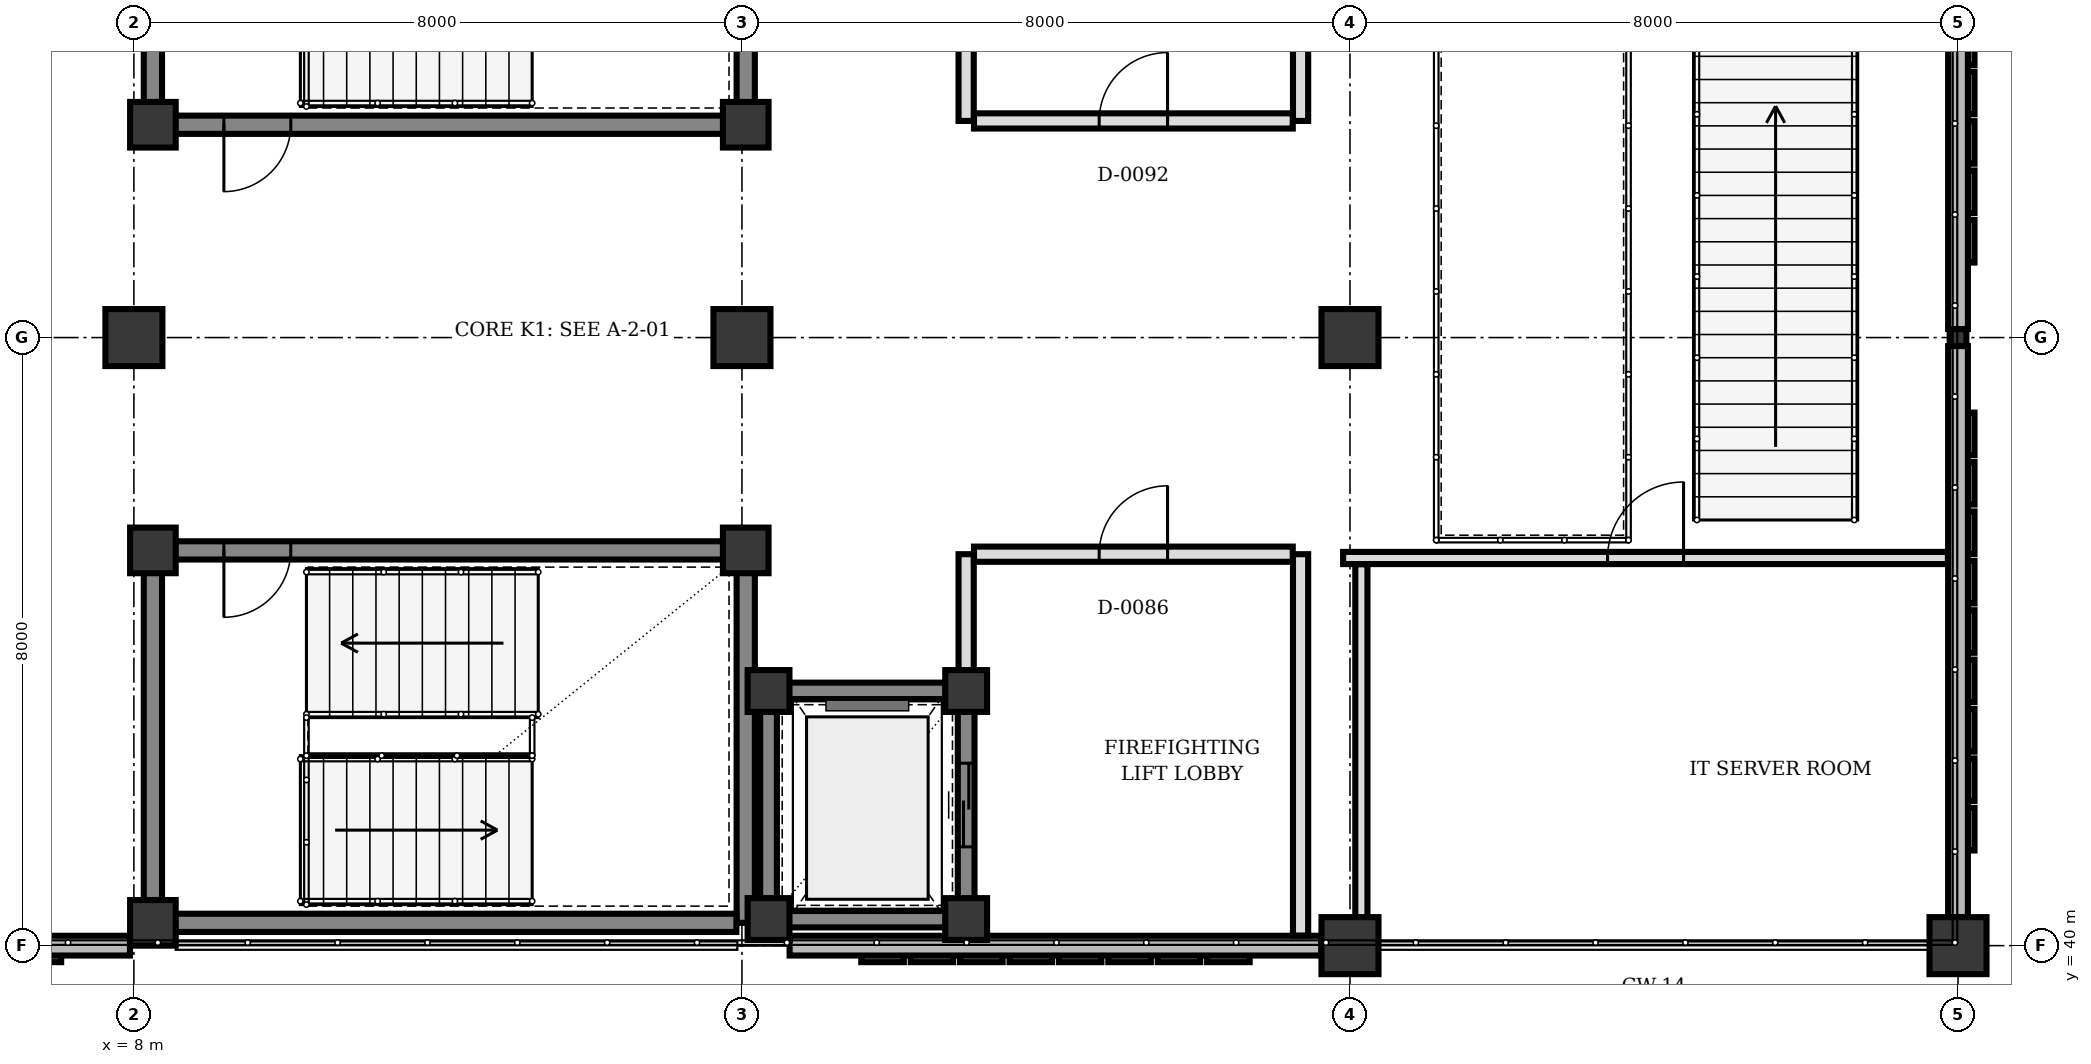
"""IFC4 building model, lengths in metres.
Left out: names, types, materials, properties, quantities, classifications, styles, units other than length and angle.
Written with IfcOpenShell. Run it as: python <this file> out.ifc"""

import sys

from ifc_helpers import new_model, si_unit, direction, frame, frame_2d, origin, origin_2d, place, context, subcontext, project, spatial, rectangle, hollow_rectangle, extrude, element, fill, save


model = new_model("IFC4")
c1 = context("Model", 3, precision=1e-05, world=origin(), true_north=direction((0.0, 1.0)))
c2 = subcontext(c1, "Body", "Model", "MODEL_VIEW")
j1 = project(units=[si_unit("LENGTHUNIT", "METRE"), si_unit("PLANEANGLEUNIT", "RADIAN")], contexts=[c1])
p1 = place(None, origin())
s1 = spatial("IfcSite", under=j1, at=p1, CompositionType="ELEMENT")
p2 = place(p1, origin())
s2 = spatial("IfcBuilding", under=s1, at=p2, CompositionType="ELEMENT")
p3 = place(p2, frame((0.0, 0.0, 4.5)))
s3 = spatial("IfcBuildingStorey", under=s2, at=p3, CompositionType="ELEMENT", Elevation=4.5)
for number, where, z_axis, x_axis in (
    (1, (8.25, 40.3, 0.0), (0.0, 0.0, 1.0), (1.0, 0.0, 0.0)),
    (2, (16.05, 45.2, 0.0), (0.0, 0.0, 1.0), (1.0, 0.0, 0.0)),
    (3, (8.25, 45.2, 0.0), (0.0, 0.0, 1.0), (1.0, 0.0, 0.0)),
    (4, (8.25, 50.8, 0.0), (0.0, 0.0, 1.0), (1.0, 0.0, 0.0)),
    (5, (16.05, 50.8, 0.0), (0.0, 0.0, 1.0), (1.0, 0.0, 0.0)),
):
    element("IfcColumn", number, at=place(p3, frame(where, z_axis=z_axis, x_axis=x_axis)), inside=s3, PredefinedType="COLUMN", context=c2, shape_type="SweptSolid", body=[
        extrude(rectangle(XDim=0.6, YDim=0.6, at=origin_2d()), origin(), (0.0, 0.0, 1.0), 4.0),
    ])
for number, where, z_axis, x_axis in (
    (6, (16.35, 40.35, 0.0), (0.0, 0.0, 1.0), (1.0, 0.0, 0.0)),
    (7, (18.95, 40.35, 0.0), (0.0, 0.0, 1.0), (1.0, 0.0, 0.0)),
    (8, (18.95, 43.35, 0.0), (0.0, 0.0, 1.0), (1.0, 0.0, 0.0)),
    (9, (16.35, 43.35, 0.0), (0.0, 0.0, 1.0), (1.0, 0.0, 0.0)),
):
    element("IfcColumn", number, at=place(p3, frame(where, z_axis=z_axis, x_axis=x_axis)), inside=s3, PredefinedType="COLUMN", context=c2, shape_type="SweptSolid", body=[
        extrude(rectangle(XDim=0.55, YDim=0.55, at=origin_2d()), origin(), (0.0, 0.0, 1.0), 4.0),
    ])
for number, where, z_axis, x_axis in (
    (10, (16.0, 48.0, 0.0), (0.0, 0.0, 1.0), (1.0, 0.0, 0.0)),
    (11, (24.0, 40.0, 0.0), (0.0, 0.0, 1.0), (1.0, 0.0, 0.0)),
    (12, (24.0, 48.0, 0.0), (0.0, 0.0, 1.0), (1.0, 0.0, 0.0)),
    (13, (32.0, 40.0, 0.0), (0.0, 0.0, 1.0), (1.0, 0.0, 0.0)),
):
    element("IfcColumn", number, at=place(p3, frame(where, z_axis=z_axis, x_axis=x_axis)), inside=s3, PredefinedType="COLUMN", context=c2, shape_type="SweptSolid", body=[
        extrude(rectangle(XDim=0.75, YDim=0.75, at=origin_2d()), origin(), (0.0, 0.0, 1.0), 4.0),
    ])
p4 = place(p3, frame((32.0, 48.0, 0.0), z_axis=(0.0, 0.0, 1.0), x_axis=(1.0, 0.0, 0.0)))
e14 = element("IfcColumn", 14, at=p4, inside=s3, PredefinedType="COLUMN", context=c2, shape_type="SweptSolid", body=[
    extrude(hollow_rectangle(XDim=0.22, YDim=0.22, WallThickness=0.01, at=origin_2d()), origin(), (0.0, 0.0, 1.0), 4.0),
])
p5 = place(p3, frame((8.0, 48.0, 0.0), z_axis=(0.0, 0.0, 1.0), x_axis=(1.0, 0.0, 0.0)))
e15 = element("IfcColumn", 15, at=p5, inside=s3, PredefinedType="COLUMN", context=c2, shape_type="SweptSolid", body=[
    extrude(rectangle(XDim=0.75, YDim=0.75, at=origin_2d()), origin(), (0.0, 0.0, 1.0), 4.0),
])
for number, where, z_axis, x_axis in (
    (16, (32.0, 55.623, 0.0), (0.0, 0.0, 1.0), (0.0, -1.0, 0.0)),
    (17, (32.0, 47.888, 0.0), (0.0, 0.0, 1.0), (0.0, -1.0, 0.0)),
):
    element("IfcWall", number, at=place(p3, frame(where, z_axis=z_axis, x_axis=x_axis)), inside=s3, PredefinedType="SOLIDWALL", context=c2, shape_type="SweptSolid", body=[
        extrude(rectangle(XDim=7.511, YDim=0.26, at=frame_2d((3.755, 0.0))), origin(), (0.0, 0.0, 1.0), 3.132),
    ])
p6 = place(p3, frame((23.623, 40.0, 0.0), z_axis=(0.0, 0.0, 1.0), x_axis=(-1.0, 0.0, 0.0)))
e18 = element("IfcWall", 18, at=p6, inside=s3, PredefinedType="SOLIDWALL", context=c2, shape_type="SweptSolid", body=[
    extrude(rectangle(XDim=6.996, YDim=0.26, at=frame_2d((3.498, 0.0))), origin(), (0.0, 0.0, 1.0), 3.55),
])
p7 = place(p3, frame((7.948, 40.0, 0.0), z_axis=(0.0, 0.0, 1.0), x_axis=(-1.0, 0.0, 0.0)))
e19 = element("IfcWall", 19, at=p7, inside=s3, PredefinedType="SOLIDWALL", context=c2, shape_type="SweptSolid", body=[
    extrude(rectangle(XDim=7.571, YDim=0.26, at=frame_2d((3.786, 0.0))), origin(), (0.0, 0.0, 1.0), 3.55),
])
p8 = place(p7, frame((1.696, 0.0, 0.9)))
e20 = element("IfcOpeningElement", 20, at=p8, cuts=e19, PredefinedType="OPENING", context=c2, shape_type="SweptSolid", body=[
    extrude(rectangle(XDim=1.15, YDim=1.25, at=frame_2d((0.575, 0.625))), frame((0.0, 0.14, 0.0), z_axis=(0.0, -1.0, 0.0), x_axis=(1.0, 0.0, 0.0)), (0.0, 0.0, 1.0), 0.28),
])
p9 = place(p3, frame((8.25, 40.592, 0.0), z_axis=(0.0, 0.0, 1.0), x_axis=(0.0, 1.0, 0.0)))
e21 = element("IfcWall", 21, at=p9, inside=s3, PredefinedType="SHEAR", context=c2, shape_type="SweptSolid", body=[
    extrude(rectangle(XDim=4.316, YDim=0.24, at=frame_2d((2.158, 0.0))), origin(), (0.0, 0.0, 1.0), 3.74),
])
p10 = place(p3, frame((16.05, 44.908, 0.0), z_axis=(0.0, 0.0, 1.0), x_axis=(0.0, -1.0, 0.0)))
e22 = element("IfcWall", 22, at=p10, inside=s3, PredefinedType="SHEAR", context=c2, shape_type="SweptSolid", body=[
    extrude(rectangle(XDim=4.608, YDim=0.24, at=frame_2d((2.304, 0.0))), origin(), (0.0, 0.0, 1.0), 3.74),
])
p11 = place(p3, frame((15.927, 40.3, 0.0), z_axis=(0.0, 0.0, 1.0), x_axis=(-1.0, 0.0, 0.0)))
e23 = element("IfcWall", 23, at=p11, inside=s3, PredefinedType="SHEAR", context=c2, shape_type="SweptSolid", body=[
    extrude(rectangle(XDim=7.385, YDim=0.24, at=frame_2d((3.692, 0.0))), origin(), (0.0, 0.0, 1.0), 3.74),
])
p12 = place(p3, frame((15.758, 45.2, 0.0), z_axis=(0.0, 0.0, 1.0), x_axis=(-1.0, 0.0, 0.0)))
e24 = element("IfcWall", 24, at=p12, inside=s3, PredefinedType="SHEAR", context=c2, shape_type="SweptSolid", body=[
    extrude(rectangle(XDim=7.216, YDim=0.24, at=frame_2d((3.608, 0.0))), origin(), (0.0, 0.0, 1.0), 3.74),
])
p13 = place(p12, frame((5.694, 0.0, 0.0)))
e25 = element("IfcOpeningElement", 25, at=p13, cuts=e24, PredefinedType="OPENING", context=c2, shape_type="SweptSolid", body=[
    extrude(rectangle(XDim=0.88, YDim=2.1, at=frame_2d((0.44, 1.05))), frame((0.0, 0.13, 0.0), z_axis=(0.0, -1.0, 0.0), x_axis=(1.0, 0.0, 0.0)), (0.0, 0.0, 1.0), 0.26),
])
p14 = place(p3, frame((8.25, 51.092, 0.0), z_axis=(0.0, 0.0, 1.0), x_axis=(0.0, 1.0, 0.0)))
e26 = element("IfcWall", 26, at=p14, inside=s3, PredefinedType="SHEAR", context=c2, shape_type="SweptSolid", body=[
    extrude(rectangle(XDim=4.316, YDim=0.24, at=frame_2d((2.158, 0.0))), origin(), (0.0, 0.0, 1.0), 3.74),
])
p15 = place(p3, frame((16.05, 55.7, 0.0), z_axis=(0.0, 0.0, 1.0), x_axis=(0.0, -1.0, 0.0)))
e27 = element("IfcWall", 27, at=p15, inside=s3, PredefinedType="SHEAR", context=c2, shape_type="SweptSolid", body=[
    extrude(rectangle(XDim=4.608, YDim=0.24, at=frame_2d((2.304, 0.0))), origin(), (0.0, 0.0, 1.0), 3.74),
])
p16 = place(p3, frame((15.758, 50.8, 0.0), z_axis=(0.0, 0.0, 1.0), x_axis=(-1.0, 0.0, 0.0)))
e28 = element("IfcWall", 28, at=p16, inside=s3, PredefinedType="SHEAR", context=c2, shape_type="SweptSolid", body=[
    extrude(rectangle(XDim=7.216, YDim=0.24, at=frame_2d((3.608, 0.0))), origin(), (0.0, 0.0, 1.0), 3.74),
])
p17 = place(p16, frame((5.694, 0.0, 0.0)))
e29 = element("IfcOpeningElement", 29, at=p17, cuts=e28, PredefinedType="OPENING", context=c2, shape_type="SweptSolid", body=[
    extrude(rectangle(XDim=0.88, YDim=2.1, at=frame_2d((0.44, 1.05))), frame((0.0, 0.13, 0.0), z_axis=(0.0, -1.0, 0.0), x_axis=(1.0, 0.0, 0.0)), (0.0, 0.0, 1.0), 0.26),
])
p18 = place(p3, frame((16.617, 40.35, 0.0), z_axis=(0.0, 0.0, 1.0), x_axis=(1.0, 0.0, 0.0)))
e30 = element("IfcWall", 30, at=p18, inside=s3, PredefinedType="SHEAR", context=c2, shape_type="SweptSolid", body=[
    extrude(rectangle(XDim=2.066, YDim=0.22, at=frame_2d((1.033, 0.0))), origin(), (0.0, 0.0, 1.0), 3.74),
])
p19 = place(p3, frame((18.95, 40.617, 0.0), z_axis=(0.0, 0.0, 1.0), x_axis=(0.0, 1.0, 0.0)))
e31 = element("IfcWall", 31, at=p19, inside=s3, PredefinedType="SHEAR", context=c2, shape_type="SweptSolid", body=[
    extrude(rectangle(XDim=2.466, YDim=0.22, at=frame_2d((1.233, 0.0))), origin(), (0.0, 0.0, 1.0), 3.74),
])
p20 = place(p19, frame((0.683, 0.0, 0.0)))
e32 = element("IfcOpeningElement", 32, at=p20, cuts=e31, PredefinedType="OPENING", context=c2, shape_type="SweptSolid", body=[
    extrude(rectangle(XDim=1.1, YDim=2.15, at=frame_2d((0.55, 1.075))), frame((0.0, 0.12, 0.0), z_axis=(0.0, -1.0, 0.0), x_axis=(1.0, 0.0, 0.0)), (0.0, 0.0, 1.0), 0.24),
])
p21 = place(p3, frame((18.683, 43.35, 0.0), z_axis=(0.0, 0.0, 1.0), x_axis=(-1.0, 0.0, 0.0)))
e33 = element("IfcWall", 33, at=p21, inside=s3, PredefinedType="SHEAR", context=c2, shape_type="SweptSolid", body=[
    extrude(rectangle(XDim=2.066, YDim=0.22, at=frame_2d((1.033, 0.0))), origin(), (0.0, 0.0, 1.0), 3.74),
])
p22 = place(p3, frame((16.35, 43.083, 0.0), z_axis=(0.0, 0.0, 1.0), x_axis=(0.0, -1.0, 0.0)))
e34 = element("IfcWall", 34, at=p22, inside=s3, PredefinedType="SHEAR", context=c2, shape_type="SweptSolid", body=[
    extrude(rectangle(XDim=2.466, YDim=0.22, at=frame_2d((1.233, 0.0))), origin(), (0.0, 0.0, 1.0), 3.74),
])
p23 = place(p3, frame((18.95, 43.617, 0.0), z_axis=(0.0, 0.0, 1.0), x_axis=(0.0, 1.0, 0.0)))
e35 = element("IfcWall", 35, at=p23, inside=s3, PredefinedType="PARTITIONING", context=c2, shape_type="SweptSolid", body=[
    extrude(rectangle(XDim=1.533, YDim=0.2, at=frame_2d((0.767, 0.0))), origin(), (0.0, 0.0, 1.0), 3.7),
])
p24 = place(p3, frame((23.35, 40.133, 0.0), z_axis=(0.0, 0.0, 1.0), x_axis=(0.0, 1.0, 0.0)))
e36 = element("IfcWall", 36, at=p24, inside=s3, PredefinedType="PARTITIONING", context=c2, shape_type="SweptSolid", body=[
    extrude(rectangle(XDim=5.017, YDim=0.2, at=frame_2d((2.508, 0.0))), origin(), (0.0, 0.0, 1.0), 3.7),
])
p25 = place(p3, frame((19.053, 45.15, 0.0), z_axis=(0.0, 0.0, 1.0), x_axis=(1.0, 0.0, 0.0)))
e37 = element("IfcWall", 37, at=p25, inside=s3, PredefinedType="PARTITIONING", context=c2, shape_type="SweptSolid", body=[
    extrude(rectangle(XDim=4.194, YDim=0.2, at=frame_2d((2.097, 0.0))), origin(), (0.0, 0.0, 1.0), 3.7),
])
p26 = place(p25, frame((1.647, 0.0, 0.0)))
e38 = element("IfcOpeningElement", 38, at=p26, cuts=e37, PredefinedType="OPENING", context=c2, shape_type="SweptSolid", body=[
    extrude(rectangle(XDim=0.9, YDim=2.2, at=frame_2d((0.45, 1.1))), frame((0.0, 0.11, 0.0), z_axis=(0.0, -1.0, 0.0), x_axis=(1.0, 0.0, 0.0)), (0.0, 0.0, 1.0), 0.22),
])
p27 = place(p3, frame((18.95, 50.85, 0.0), z_axis=(0.0, 0.0, 1.0), x_axis=(0.0, 1.0, 0.0)))
e39 = element("IfcWall", 39, at=p27, inside=s3, PredefinedType="PARTITIONING", context=c2, shape_type="SweptSolid", body=[
    extrude(rectangle(XDim=1.533, YDim=0.2, at=frame_2d((0.767, 0.0))), origin(), (0.0, 0.0, 1.0), 3.7),
])
p28 = place(p3, frame((23.35, 50.85, 0.0), z_axis=(0.0, 0.0, 1.0), x_axis=(0.0, 1.0, 0.0)))
e40 = element("IfcWall", 40, at=p28, inside=s3, PredefinedType="PARTITIONING", context=c2, shape_type="SweptSolid", body=[
    extrude(rectangle(XDim=4.8, YDim=0.2, at=frame_2d((2.4, 0.0))), origin(), (0.0, 0.0, 1.0), 3.7),
])
p29 = place(p3, frame((19.053, 50.85, 0.0), z_axis=(0.0, 0.0, 1.0), x_axis=(1.0, 0.0, 0.0)))
e41 = element("IfcWall", 41, at=p29, inside=s3, PredefinedType="PARTITIONING", context=c2, shape_type="SweptSolid", body=[
    extrude(rectangle(XDim=4.194, YDim=0.2, at=frame_2d((2.097, 0.0))), origin(), (0.0, 0.0, 1.0), 3.7),
])
p30 = place(p29, frame((1.647, 0.0, 0.0)))
e42 = element("IfcOpeningElement", 42, at=p30, cuts=e41, PredefinedType="OPENING", context=c2, shape_type="SweptSolid", body=[
    extrude(rectangle(XDim=0.9, YDim=2.2, at=frame_2d((0.45, 1.1))), frame((0.0, 0.11, 0.0), z_axis=(0.0, -1.0, 0.0), x_axis=(1.0, 0.0, 0.0)), (0.0, 0.0, 1.0), 0.22),
])
p31 = place(p3, frame((23.91, 45.1, 0.0), z_axis=(0.0, 0.0, 1.0), x_axis=(1.0, 0.0, 0.0)))
e43 = element("IfcWall", 43, at=p31, inside=s3, PredefinedType="PARTITIONING", context=c2, shape_type="SweptSolid", body=[
    extrude(rectangle(XDim=7.957, YDim=0.16, at=frame_2d((3.979, 0.0))), origin(), (0.0, 0.0, 1.0), 3.132),
])
p32 = place(p31, frame((3.479, 0.0, 0.0)))
e44 = element("IfcOpeningElement", 44, at=p32, cuts=e43, PredefinedType="OPENING", context=c2, shape_type="SweptSolid", body=[
    extrude(rectangle(XDim=1.0, YDim=2.1, at=frame_2d((0.5, 1.05))), frame((0.0, 0.09, 0.0), z_axis=(0.0, -1.0, 0.0), x_axis=(1.0, 0.0, 0.0)), (0.0, 0.0, 1.0), 0.18),
])
p33 = place(p3, frame((24.15, 40.367, 0.0), z_axis=(0.0, 0.0, 1.0), x_axis=(0.0, 1.0, 0.0)))
e45 = element("IfcWall", 45, at=p33, inside=s3, PredefinedType="PARTITIONING", context=c2, shape_type="SweptSolid", body=[
    extrude(rectangle(XDim=4.65, YDim=0.16, at=frame_2d((2.325, 0.0))), origin(), (0.0, 0.0, 1.0), 3.132),
])
p34 = place(p13, origin())
e46 = element("IfcDoor", 46, at=p34, inside=s3, OperationType="SINGLE_SWING_RIGHT", PredefinedType="DOOR", context=c2, shape_type="SweptSolid", body=[
    extrude(rectangle(XDim=0.88, YDim=2.1, at=frame_2d((0.44, 1.05))), frame((0.0, 0.025, 0.0), z_axis=(0.0, -1.0, 0.0), x_axis=(1.0, 0.0, 0.0)), (0.0, 0.0, 1.0), 0.05),
])
fill(e25, e46)
p35 = place(p17, origin())
e47 = element("IfcDoor", 47, at=p35, inside=s3, OperationType="SINGLE_SWING_RIGHT", PredefinedType="DOOR", context=c2, shape_type="SweptSolid", body=[
    extrude(rectangle(XDim=0.88, YDim=2.1, at=frame_2d((0.44, 1.05))), frame((0.0, 0.025, 0.0), z_axis=(0.0, -1.0, 0.0), x_axis=(1.0, 0.0, 0.0)), (0.0, 0.0, 1.0), 0.05),
])
fill(e29, e47)
p36 = place(p20, origin())
e48 = element("IfcDoor", 48, at=p36, inside=s3, OperationType="DOUBLE_DOOR_SLIDING", PredefinedType="DOOR", context=c2, shape_type="SweptSolid", body=[
    extrude(rectangle(XDim=1.1, YDim=2.15, at=frame_2d((0.55, 1.075))), frame((0.0, 0.025, 0.0), z_axis=(0.0, -1.0, 0.0), x_axis=(1.0, 0.0, 0.0)), (0.0, 0.0, 1.0), 0.05),
])
fill(e32, e48)
p37 = place(p26, origin())
e49 = element("IfcDoor", 49, at=p37, inside=s3, OperationType="SINGLE_SWING_RIGHT", PredefinedType="DOOR", context=c2, shape_type="SweptSolid", body=[
    extrude(rectangle(XDim=0.9, YDim=2.2, at=frame_2d((0.45, 1.1))), frame((0.0, 0.025, 0.0), z_axis=(0.0, -1.0, 0.0), x_axis=(1.0, 0.0, 0.0)), (0.0, 0.0, 1.0), 0.05),
])
fill(e38, e49)
p38 = place(p30, origin())
e50 = element("IfcDoor", 50, at=p38, inside=s3, OperationType="SINGLE_SWING_RIGHT", PredefinedType="DOOR", context=c2, shape_type="SweptSolid", body=[
    extrude(rectangle(XDim=0.9, YDim=2.2, at=frame_2d((0.45, 1.1))), frame((0.0, 0.025, 0.0), z_axis=(0.0, -1.0, 0.0), x_axis=(1.0, 0.0, 0.0)), (0.0, 0.0, 1.0), 0.05),
])
fill(e42, e50)
p39 = place(p32, origin())
e51 = element("IfcDoor", 51, at=p39, inside=s3, OperationType="SINGLE_SWING_RIGHT", PredefinedType="DOOR", context=c2, shape_type="SweptSolid", body=[
    extrude(rectangle(XDim=1.0, YDim=2.1, at=frame_2d((0.5, 1.05))), frame((0.0, 0.025, 0.0), z_axis=(0.0, -1.0, 0.0), x_axis=(1.0, 0.0, 0.0)), (0.0, 0.0, 1.0), 0.05),
])
fill(e44, e51)
save(model, sys.argv[1])
